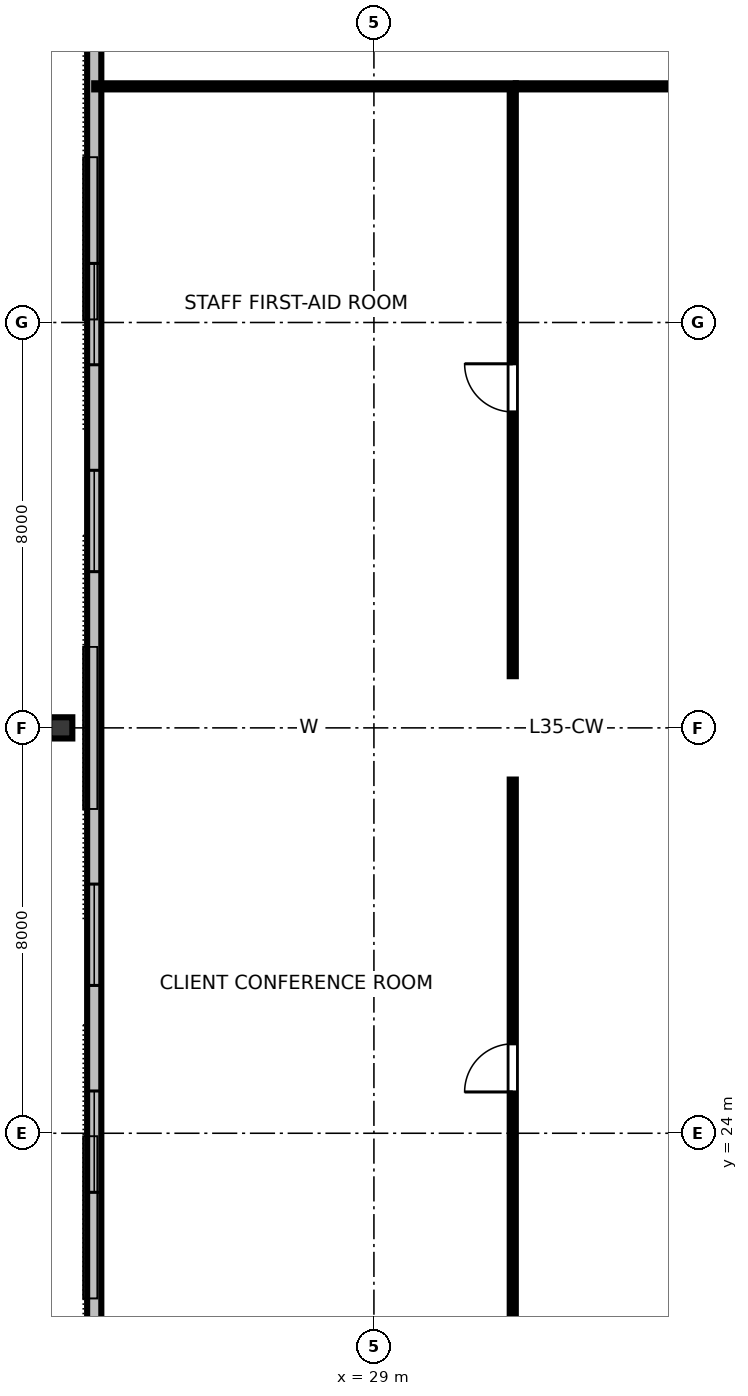
"""IFC4 building model, lengths in metres.
Left out: names, types, materials, properties, quantities, classifications, styles, units other than length and angle.
Written with IfcOpenShell. Run it as: python <this file> out.ifc"""

import sys

from ifc_helpers import new_model, si_unit, direction, frame, frame_2d, origin, origin_2d, place, context, subcontext, project, spatial, rectangle, i_section, extrude, element, fill, save


model = new_model("IFC4")
c1 = context("Model", 3, precision=1e-05, world=origin(), true_north=direction((0.0, 1.0)))
c2 = subcontext(c1, "Body", "Model", "MODEL_VIEW")
j1 = project(units=[si_unit("LENGTHUNIT", "METRE"), si_unit("PLANEANGLEUNIT", "RADIAN")], contexts=[c1])
p1 = place(None, origin())
s1 = spatial("IfcSite", under=j1, at=p1, CompositionType="ELEMENT")
p2 = place(p1, origin())
s2 = spatial("IfcBuilding", under=s1, at=p2, CompositionType="ELEMENT")
p3 = place(p2, frame((0.0, 0.0, 134.8)))
s3 = spatial("IfcBuildingStorey", under=s2, at=p3, CompositionType="ELEMENT", Elevation=134.8)
p4 = place(p3, frame((22.82, 32.0, 0.0), z_axis=(-0.089001216718, 0.0, 0.996031517284), x_axis=(0.996031517284, 0.0, 0.089001216718)))
e1 = element("IfcColumn", 1, at=p4, inside=s3, PredefinedType="COLUMN", context=c2, shape_type="SweptSolid", body=[
    extrude(i_section(OverallWidth=0.418, OverallDepth=0.455, WebThickness=0.042, FlangeThickness=0.068, FilletRadius=0.025, at=origin_2d()), origin(), (0.0, 0.0, 1.0), 3.371),
])
p5 = place(p3, frame((23.48, 47.39, 0.0), z_axis=(0.0, 0.0, 1.0), x_axis=(0.0, -1.0, 0.0)))
e2 = element("IfcWall", 2, at=p5, inside=s3, PredefinedType="STANDARD", context=c2, shape_type="SweptSolid", body=[
    extrude(rectangle(XDim=30.78, YDim=0.28, at=frame_2d((15.39, 0.0))), origin(), (0.0, 0.0, 1.0), 3.36),
])
p6 = place(p5, frame((6.224, 0.0, 0.8)))
e3 = element("IfcOpeningElement", 3, at=p6, cuts=e2, PredefinedType="OPENING", context=c2, shape_type="SweptSolid", body=[
    extrude(rectangle(XDim=2.0, YDim=1.95, at=frame_2d((1.0, 0.975))), frame((0.0, 0.15, 0.0), z_axis=(0.0, -1.0, 0.0), x_axis=(1.0, 0.0, 0.0)), (0.0, 0.0, 1.0), 0.3),
])
p7 = place(p5, frame((10.307, 0.0, 0.8)))
e4 = element("IfcOpeningElement", 4, at=p7, cuts=e2, PredefinedType="OPENING", context=c2, shape_type="SweptSolid", body=[
    extrude(rectangle(XDim=2.0, YDim=1.95, at=frame_2d((1.0, 0.975))), frame((0.0, 0.15, 0.0), z_axis=(0.0, -1.0, 0.0), x_axis=(1.0, 0.0, 0.0)), (0.0, 0.0, 1.0), 0.3),
])
p8 = place(p5, frame((18.473, 0.0, 0.8)))
e5 = element("IfcOpeningElement", 5, at=p8, cuts=e2, PredefinedType="OPENING", context=c2, shape_type="SweptSolid", body=[
    extrude(rectangle(XDim=2.0, YDim=1.95, at=frame_2d((1.0, 0.975))), frame((0.0, 0.15, 0.0), z_axis=(0.0, -1.0, 0.0), x_axis=(1.0, 0.0, 0.0)), (0.0, 0.0, 1.0), 0.3),
])
p9 = place(p5, frame((22.556, 0.0, 0.8)))
e6 = element("IfcOpeningElement", 6, at=p9, cuts=e2, PredefinedType="OPENING", context=c2, shape_type="SweptSolid", body=[
    extrude(rectangle(XDim=2.0, YDim=1.95, at=frame_2d((1.0, 0.975))), frame((0.0, 0.15, 0.0), z_axis=(0.0, -1.0, 0.0), x_axis=(1.0, 0.0, 0.0)), (0.0, 0.0, 1.0), 0.3),
])
p10 = place(p3, frame((31.8, 44.66, 0.0), z_axis=(0.0, 0.0, 1.0), x_axis=(1.0, 0.0, 0.0)))
e7 = element("IfcWall", 7, at=p10, inside=s3, PredefinedType="PARTITIONING", context=c2, shape_type="SweptSolid", body=[
    extrude(rectangle(XDim=28.4, YDim=0.12, at=frame_2d((14.2, 0.0))), origin(), (0.0, 0.0, 1.0), 2.64),
])
p11 = place(p10, frame((4.544, 0.0, 0.0)))
e8 = element("IfcOpeningElement", 8, at=p11, cuts=e7, PredefinedType="OPENING", context=c2, shape_type="SweptSolid", body=[
    extrude(rectangle(XDim=0.95, YDim=2.15, at=frame_2d((0.475, 1.075))), frame((0.0, 0.07, 0.0), z_axis=(0.0, -1.0, 0.0), x_axis=(1.0, 0.0, 0.0)), (0.0, 0.0, 1.0), 0.14),
])
p12 = place(p10, frame((11.807, 0.0, 0.0)))
e9 = element("IfcOpeningElement", 9, at=p12, cuts=e7, PredefinedType="OPENING", context=c2, shape_type="SweptSolid", body=[
    extrude(rectangle(XDim=0.95, YDim=2.15, at=frame_2d((0.475, 1.075))), frame((0.0, 0.07, 0.0), z_axis=(0.0, -1.0, 0.0), x_axis=(1.0, 0.0, 0.0)), (0.0, 0.0, 1.0), 0.14),
])
p13 = place(p10, frame((17.048, 0.0, 0.0)))
e10 = element("IfcOpeningElement", 10, at=p13, cuts=e7, PredefinedType="OPENING", context=c2, shape_type="SweptSolid", body=[
    extrude(rectangle(XDim=0.95, YDim=2.15, at=frame_2d((0.475, 1.075))), frame((0.0, 0.07, 0.0), z_axis=(0.0, -1.0, 0.0), x_axis=(1.0, 0.0, 0.0)), (0.0, 0.0, 1.0), 0.14),
])
p14 = place(p10, frame((23.845, 0.0, 0.0)))
e11 = element("IfcOpeningElement", 11, at=p14, cuts=e7, PredefinedType="OPENING", context=c2, shape_type="SweptSolid", body=[
    extrude(rectangle(XDim=0.95, YDim=2.15, at=frame_2d((0.475, 1.075))), frame((0.0, 0.07, 0.0), z_axis=(0.0, -1.0, 0.0), x_axis=(1.0, 0.0, 0.0)), (0.0, 0.0, 1.0), 0.14),
])
p15 = place(p3, frame((31.74, 19.4, 0.0), z_axis=(0.0, 0.0, 1.0), x_axis=(0.0, 1.0, 0.0)))
e12 = element("IfcWall", 12, at=p15, inside=s3, PredefinedType="PARTITIONING", context=c2, shape_type="SweptSolid", body=[
    extrude(rectangle(XDim=11.58, YDim=0.12, at=frame_2d((5.79, 0.0))), origin(), (0.0, 0.0, 1.0), 2.64),
])
p16 = place(p15, frame((5.415, 0.0, 0.0)))
e13 = element("IfcOpeningElement", 13, at=p16, cuts=e12, PredefinedType="OPENING", context=c2, shape_type="SweptSolid", body=[
    extrude(rectangle(XDim=0.95, YDim=2.15, at=frame_2d((0.475, 1.075))), frame((0.0, 0.07, 0.0), z_axis=(0.0, -1.0, 0.0), x_axis=(1.0, 0.0, 0.0)), (0.0, 0.0, 1.0), 0.14),
])
p17 = place(p3, frame((31.74, 33.02, 0.0), z_axis=(0.0, 0.0, 1.0), x_axis=(0.0, 1.0, 0.0)))
e14 = element("IfcWall", 14, at=p17, inside=s3, PredefinedType="PARTITIONING", context=c2, shape_type="SweptSolid", body=[
    extrude(rectangle(XDim=11.58, YDim=0.12, at=frame_2d((5.79, 0.0))), origin(), (0.0, 0.0, 1.0), 2.64),
])
p18 = place(p17, frame((5.215, 0.0, 0.0)))
e15 = element("IfcOpeningElement", 15, at=p18, cuts=e14, PredefinedType="OPENING", context=c2, shape_type="SweptSolid", body=[
    extrude(rectangle(XDim=0.95, YDim=2.15, at=frame_2d((0.475, 1.075))), frame((0.0, 0.07, 0.0), z_axis=(0.0, -1.0, 0.0), x_axis=(1.0, 0.0, 0.0)), (0.0, 0.0, 1.0), 0.14),
])
p19 = place(p3, frame((31.8, 44.66, 0.0), z_axis=(0.0, 0.0, 1.0), x_axis=(-1.0, 0.0, 0.0)))
e16 = element("IfcWall", 16, at=p19, inside=s3, PredefinedType="PARTITIONING", context=c2, shape_type="SweptSolid", body=[
    extrude(rectangle(XDim=8.32, YDim=0.12, at=frame_2d((4.16, 0.0))), origin(), (0.0, 0.0, 1.0), 2.64),
])
p20 = place(p6, origin())
e17 = element("IfcWindow", 17, at=p20, inside=s3, PartitioningType="SINGLE_PANEL", PredefinedType="WINDOW", context=c2, shape_type="SweptSolid", body=[
    extrude(rectangle(XDim=2.0, YDim=1.95, at=frame_2d((1.0, 0.975))), frame((0.0, 0.03, 0.0), z_axis=(0.0, -1.0, 0.0), x_axis=(1.0, 0.0, 0.0)), (0.0, 0.0, 1.0), 0.06),
])
fill(e3, e17)
p21 = place(p7, origin())
e18 = element("IfcWindow", 18, at=p21, inside=s3, PartitioningType="SINGLE_PANEL", PredefinedType="WINDOW", context=c2, shape_type="SweptSolid", body=[
    extrude(rectangle(XDim=2.0, YDim=1.95, at=frame_2d((1.0, 0.975))), frame((0.0, 0.03, 0.0), z_axis=(0.0, -1.0, 0.0), x_axis=(1.0, 0.0, 0.0)), (0.0, 0.0, 1.0), 0.06),
])
fill(e4, e18)
p22 = place(p8, origin())
e19 = element("IfcWindow", 19, at=p22, inside=s3, PartitioningType="SINGLE_PANEL", PredefinedType="WINDOW", context=c2, shape_type="SweptSolid", body=[
    extrude(rectangle(XDim=2.0, YDim=1.95, at=frame_2d((1.0, 0.975))), frame((0.0, 0.03, 0.0), z_axis=(0.0, -1.0, 0.0), x_axis=(1.0, 0.0, 0.0)), (0.0, 0.0, 1.0), 0.06),
])
fill(e5, e19)
p23 = place(p9, origin())
e20 = element("IfcWindow", 20, at=p23, inside=s3, PartitioningType="SINGLE_PANEL", PredefinedType="WINDOW", context=c2, shape_type="SweptSolid", body=[
    extrude(rectangle(XDim=2.0, YDim=1.95, at=frame_2d((1.0, 0.975))), frame((0.0, 0.03, 0.0), z_axis=(0.0, -1.0, 0.0), x_axis=(1.0, 0.0, 0.0)), (0.0, 0.0, 1.0), 0.06),
])
fill(e6, e20)
p24 = place(p16, origin())
e21 = element("IfcDoor", 21, at=p24, inside=s3, OperationType="SINGLE_SWING_LEFT", PredefinedType="DOOR", context=c2, shape_type="SweptSolid", body=[
    extrude(rectangle(XDim=0.95, YDim=2.15, at=frame_2d((0.475, 1.075))), frame((0.0, 0.025, 0.0), z_axis=(0.0, -1.0, 0.0), x_axis=(1.0, 0.0, 0.0)), (0.0, 0.0, 1.0), 0.05),
])
fill(e13, e21)
p25 = place(p18, origin())
e22 = element("IfcDoor", 22, at=p25, inside=s3, OperationType="SINGLE_SWING_RIGHT", PredefinedType="DOOR", context=c2, shape_type="SweptSolid", body=[
    extrude(rectangle(XDim=0.95, YDim=2.15, at=frame_2d((0.475, 1.075))), frame((0.0, 0.025, 0.0), z_axis=(0.0, -1.0, 0.0), x_axis=(1.0, 0.0, 0.0)), (0.0, 0.0, 1.0), 0.05),
])
fill(e15, e22)
save(model, sys.argv[1])
